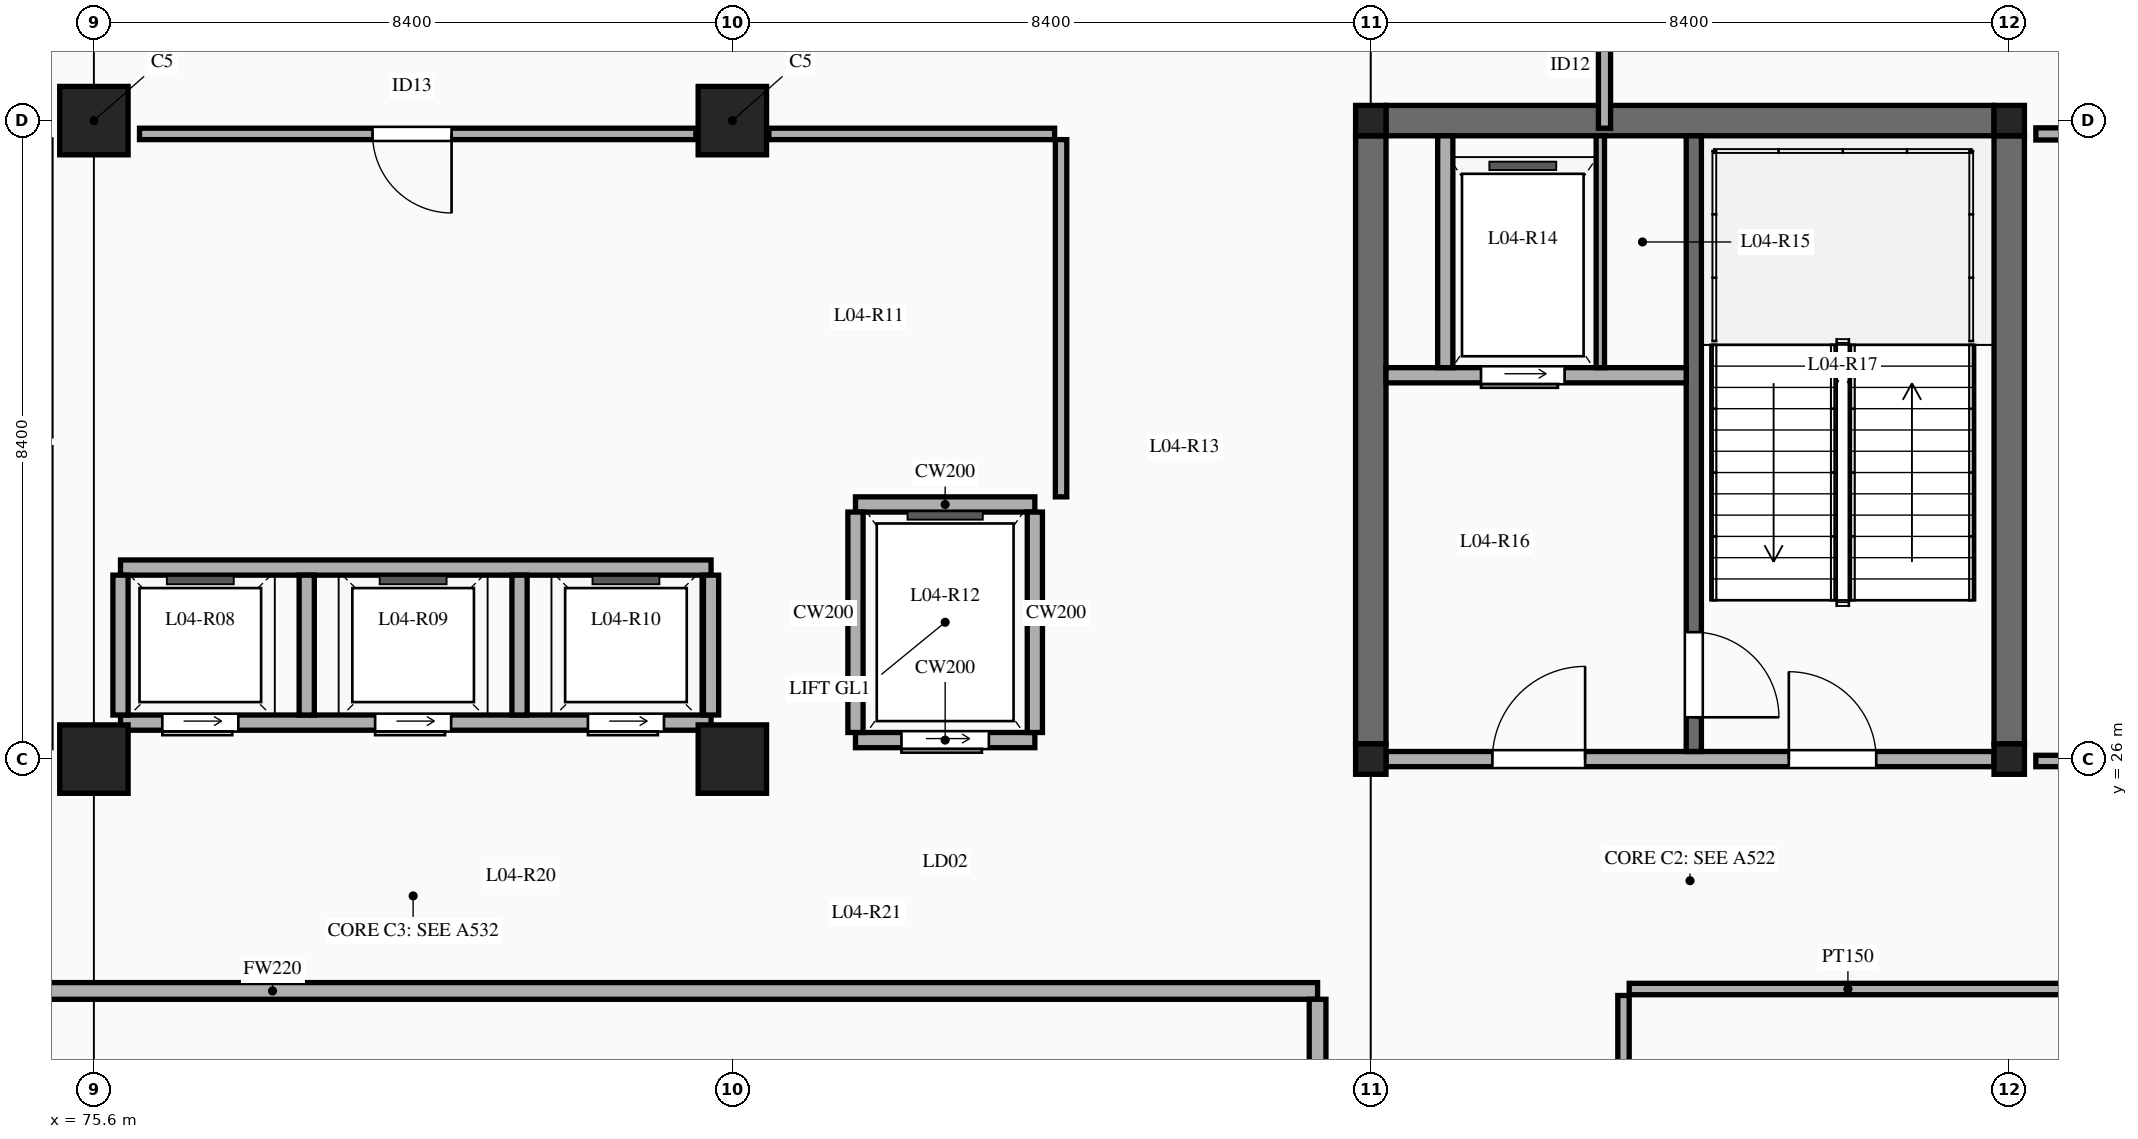
"""IFC4 building model, lengths in metres.
Left out: names, types, materials, properties, quantities, classifications, styles, units other than length and angle.
Written with IfcOpenShell. Run it as: python <this file> out.ifc"""

import sys

from ifc_helpers import new_model, si_unit, direction, frame, frame_2d, origin, origin_2d, place, context, subcontext, project, spatial, rectangle, extrude, element, fill, save


model = new_model("IFC4")
c1 = context("Model", 3, precision=1e-05, world=origin(), true_north=direction((0.0, 1.0)))
c2 = subcontext(c1, "Body", "Model", "MODEL_VIEW")
j1 = project(units=[si_unit("LENGTHUNIT", "METRE"), si_unit("PLANEANGLEUNIT", "RADIAN")], contexts=[c1])
p1 = place(None, origin())
s1 = spatial("IfcSite", under=j1, at=p1, CompositionType="ELEMENT")
p2 = place(p1, origin())
s2 = spatial("IfcBuilding", under=s1, at=p2, CompositionType="ELEMENT")
p3 = place(p2, frame((0.0, 0.0, 19.5)))
s3 = spatial("IfcBuildingStorey", under=s2, at=p3, CompositionType="ELEMENT", Elevation=19.5)
for number, where, z_axis, x_axis in (
    (1, (75.6, 26.0, 0.0), (0.0, 0.0, 1.0), (1.0, 0.0, 0.0)),
    (2, (75.6, 34.4, 0.0), (0.0, 0.0, 1.0), (1.0, 0.0, 0.0)),
    (3, (84.0, 26.0, 0.0), (0.0, 0.0, 1.0), (1.0, 0.0, 0.0)),
    (4, (84.0, 34.4, 0.0), (0.0, 0.0, 1.0), (1.0, 0.0, 0.0)),
):
    element("IfcColumn", number, at=place(p3, frame(where, z_axis=z_axis, x_axis=x_axis)), inside=s3, PredefinedType="COLUMN", context=c2, shape_type="SweptSolid", body=[
        extrude(rectangle(XDim=0.9, YDim=0.9, at=origin_2d()), origin(), (0.0, 0.0, 1.0), 4.5),
    ])
for number, where, z_axis, x_axis in (
    (5, (92.4, 26.0, 0.0), (0.0, 0.0, 1.0), (1.0, 0.0, 0.0)),
    (6, (92.4, 34.4, 0.0), (0.0, 0.0, 1.0), (1.0, 0.0, 0.0)),
    (7, (100.8, 26.0, 0.0), (0.0, 0.0, 1.0), (1.0, 0.0, 0.0)),
    (8, (100.8, 34.4, 0.0), (0.0, 0.0, 1.0), (1.0, 0.0, 0.0)),
):
    element("IfcColumn", number, at=place(p3, frame(where, z_axis=z_axis, x_axis=x_axis)), inside=s3, PredefinedType="COLUMN", context=c2, shape_type="SweptSolid", body=[
        extrude(rectangle(XDim=0.4, YDim=0.4, at=origin_2d()), origin(), (0.0, 0.0, 1.0), 4.5),
    ])
for number, where, z_axis, x_axis in (
    (9, (92.4, 26.2, 0.0), (0.0, 0.0, 1.0), (0.0, 1.0, 0.0)),
    (10, (100.8, 26.2, 0.0), (0.0, 0.0, 1.0), (0.0, 1.0, 0.0)),
    (11, (92.6, 34.4, 0.0), (0.0, 0.0, 1.0), (1.0, 0.0, 0.0)),
):
    element("IfcWall", number, at=place(p3, frame(where, z_axis=z_axis, x_axis=x_axis)), inside=s3, PredefinedType="SHEAR", context=c2, shape_type="SweptSolid", body=[
        extrude(rectangle(XDim=8.0, YDim=0.4, at=frame_2d((4.0, 0.0))), origin(), (0.0, 0.0, 1.0), 4.5),
    ])
p4 = place(p3, frame((92.6, 26.0, 0.0), z_axis=(0.0, 0.0, 1.0), x_axis=(1.0, 0.0, 0.0)))
e12 = element("IfcWall", 12, at=p4, inside=s3, PredefinedType="SOLIDWALL", context=c2, shape_type="SweptSolid", body=[
    extrude(rectangle(XDim=8.0, YDim=0.2, at=frame_2d((4.0, 0.0))), origin(), (0.0, 0.0, 1.0), 3.53),
])
p5 = place(p4, frame((1.4, 0.0, 0.0)))
e13 = element("IfcOpeningElement", 13, at=p5, cuts=e12, PredefinedType="OPENING", context=c2, shape_type="SweptSolid", body=[
    extrude(rectangle(XDim=1.22, YDim=2.15, at=frame_2d((0.61, 1.075))), frame((0.0, 0.11, 0.0), z_axis=(0.0, -1.0, 0.0), x_axis=(1.0, 0.0, 0.0)), (0.0, 0.0, 1.0), 0.22),
])
p6 = place(p4, frame((5.3, 0.0, 0.0)))
e14 = element("IfcOpeningElement", 14, at=p6, cuts=e12, PredefinedType="OPENING", context=c2, shape_type="SweptSolid", body=[
    extrude(rectangle(XDim=1.15, YDim=2.15, at=frame_2d((0.575, 1.075))), frame((0.0, 0.11, 0.0), z_axis=(0.0, -1.0, 0.0), x_axis=(1.0, 0.0, 0.0)), (0.0, 0.0, 1.0), 0.22),
])
p7 = place(p3, frame((96.65, 26.1, 0.0), z_axis=(0.0, 0.0, 1.0), x_axis=(0.0, 1.0, 0.0)))
e15 = element("IfcWall", 15, at=p7, inside=s3, PredefinedType="SOLIDWALL", context=c2, shape_type="SweptSolid", body=[
    extrude(rectangle(XDim=8.1, YDim=0.2, at=frame_2d((4.05, 0.0))), origin(), (0.0, 0.0, 1.0), 4.25),
])
p8 = place(p7, frame((0.45, 0.0, 0.0)))
e16 = element("IfcOpeningElement", 16, at=p8, cuts=e15, PredefinedType="OPENING", context=c2, shape_type="SweptSolid", body=[
    extrude(rectangle(XDim=1.12, YDim=2.15, at=frame_2d((0.56, 1.075))), frame((0.0, 0.11, 0.0), z_axis=(0.0, -1.0, 0.0), x_axis=(1.0, 0.0, 0.0)), (0.0, 0.0, 1.0), 0.22),
])
p9 = place(p3, frame((92.6, 31.05, 0.0), z_axis=(0.0, 0.0, 1.0), x_axis=(1.0, 0.0, 0.0)))
e17 = element("IfcWall", 17, at=p9, inside=s3, PredefinedType="SOLIDWALL", context=c2, shape_type="SweptSolid", body=[
    extrude(rectangle(XDim=3.95, YDim=0.2, at=frame_2d((1.975, 0.0))), origin(), (0.0, 0.0, 1.0), 4.25),
])
p10 = place(p9, frame((1.25, 0.0, 0.0)))
e18 = element("IfcOpeningElement", 18, at=p10, cuts=e17, PredefinedType="OPENING", context=c2, shape_type="SweptSolid", body=[
    extrude(rectangle(XDim=1.1, YDim=2.15, at=frame_2d((0.55, 1.075))), frame((0.0, 0.11, 0.0), z_axis=(0.0, -1.0, 0.0), x_axis=(1.0, 0.0, 0.0)), (0.0, 0.0, 1.0), 0.22),
])
p11 = place(p3, frame((95.42, 31.15, 0.0), z_axis=(0.0, 0.0, 1.0), x_axis=(0.0, 1.0, 0.0)))
e19 = element("IfcWall", 19, at=p11, inside=s3, PredefinedType="PARTITIONING", context=c2, shape_type="SweptSolid", body=[
    extrude(rectangle(XDim=3.05, YDim=0.11, at=frame_2d((1.525, 0.0))), origin(), (0.0, 0.0, 1.0), 4.25),
])
p12 = place(p3, frame((93.38, 31.15, 0.0), z_axis=(0.0, 0.0, 1.0), x_axis=(0.0, 1.0, 0.0)))
e20 = element("IfcWall", 20, at=p12, inside=s3, PredefinedType="SOLIDWALL", context=c2, shape_type="SweptSolid", body=[
    extrude(rectangle(XDim=3.05, YDim=0.2, at=frame_2d((1.525, 0.0))), origin(), (0.0, 0.0, 1.0), 4.25),
])
p13 = place(p3, frame((75.95, 26.48, 0.0), z_axis=(0.0, 0.0, 1.0), x_axis=(1.0, 0.0, 0.0)))
e21 = element("IfcWall", 21, at=p13, inside=s3, PredefinedType="SOLIDWALL", context=c2, shape_type="SweptSolid", body=[
    extrude(rectangle(XDim=7.77, YDim=0.2, at=frame_2d((3.885, 0.0))), origin(), (0.0, 0.0, 1.0), 4.25),
])
p14 = place(p13, frame((0.55, 0.0, 0.0)))
e22 = element("IfcOpeningElement", 22, at=p14, cuts=e21, PredefinedType="OPENING", context=c2, shape_type="SweptSolid", body=[
    extrude(rectangle(XDim=1.0, YDim=2.15, at=frame_2d((0.5, 1.075))), frame((0.0, 0.11, 0.0), z_axis=(0.0, -1.0, 0.0), x_axis=(1.0, 0.0, 0.0)), (0.0, 0.0, 1.0), 0.22),
])
p15 = place(p13, frame((3.35, 0.0, 0.0)))
e23 = element("IfcOpeningElement", 23, at=p15, cuts=e21, PredefinedType="OPENING", context=c2, shape_type="SweptSolid", body=[
    extrude(rectangle(XDim=1.0, YDim=2.15, at=frame_2d((0.5, 1.075))), frame((0.0, 0.11, 0.0), z_axis=(0.0, -1.0, 0.0), x_axis=(1.0, 0.0, 0.0)), (0.0, 0.0, 1.0), 0.22),
])
p16 = place(p13, frame((6.15, 0.0, 0.0)))
e24 = element("IfcOpeningElement", 24, at=p16, cuts=e21, PredefinedType="OPENING", context=c2, shape_type="SweptSolid", body=[
    extrude(rectangle(XDim=1.0, YDim=2.15, at=frame_2d((0.5, 1.075))), frame((0.0, 0.11, 0.0), z_axis=(0.0, -1.0, 0.0), x_axis=(1.0, 0.0, 0.0)), (0.0, 0.0, 1.0), 0.22),
])
p17 = place(p3, frame((75.95, 28.52, 0.0), z_axis=(0.0, 0.0, 1.0), x_axis=(1.0, 0.0, 0.0)))
e25 = element("IfcWall", 25, at=p17, inside=s3, PredefinedType="SOLIDWALL", context=c2, shape_type="SweptSolid", body=[
    extrude(rectangle(XDim=7.77, YDim=0.2, at=frame_2d((3.885, 0.0))), origin(), (0.0, 0.0, 1.0), 4.25),
])
p18 = place(p3, frame((75.95, 26.58, 0.0), z_axis=(0.0, 0.0, 1.0), x_axis=(0.0, 1.0, 0.0)))
e26 = element("IfcWall", 26, at=p18, inside=s3, PredefinedType="SOLIDWALL", context=c2, shape_type="SweptSolid", body=[
    extrude(rectangle(XDim=1.84, YDim=0.2, at=frame_2d((0.92, 0.0))), origin(), (0.0, 0.0, 1.0), 3.68),
])
for number, where, z_axis, x_axis in (
    (27, (78.4, 26.58, 0.0), (0.0, 0.0, 1.0), (0.0, 1.0, 0.0)),
    (28, (81.2, 26.58, 0.0), (0.0, 0.0, 1.0), (0.0, 1.0, 0.0)),
):
    element("IfcWall", number, at=place(p3, frame(where, z_axis=z_axis, x_axis=x_axis)), inside=s3, PredefinedType="SOLIDWALL", context=c2, shape_type="SweptSolid", body=[
        extrude(rectangle(XDim=1.84, YDim=0.2, at=frame_2d((0.92, 0.0))), origin(), (0.0, 0.0, 1.0), 4.25),
    ])
p19 = place(p3, frame((83.72, 26.58, 0.0), z_axis=(0.0, 0.0, 1.0), x_axis=(0.0, 1.0, 0.0)))
e29 = element("IfcWall", 29, at=p19, inside=s3, PredefinedType="SOLIDWALL", context=c2, shape_type="SweptSolid", body=[
    extrude(rectangle(XDim=1.84, YDim=0.2, at=frame_2d((0.92, 0.0))), origin(), (0.0, 0.0, 1.0), 3.68),
])
p20 = place(p3, frame((85.62, 26.25, 0.0), z_axis=(0.0, 0.0, 1.0), x_axis=(1.0, 0.0, 0.0)))
e30 = element("IfcWall", 30, at=p20, inside=s3, PredefinedType="SOLIDWALL", context=c2, shape_type="SweptSolid", body=[
    extrude(rectangle(XDim=2.36, YDim=0.2, at=frame_2d((1.18, 0.0))), origin(), (0.0, 0.0, 1.0), 3.53),
])
p21 = place(p20, frame((0.605, 0.0, 0.0)))
e31 = element("IfcOpeningElement", 31, at=p21, cuts=e30, PredefinedType="OPENING", context=c2, shape_type="SweptSolid", body=[
    extrude(rectangle(XDim=1.15, YDim=2.2, at=frame_2d((0.575, 1.1))), frame((0.0, 0.11, 0.0), z_axis=(0.0, -1.0, 0.0), x_axis=(1.0, 0.0, 0.0)), (0.0, 0.0, 1.0), 0.22),
])
p22 = place(p3, frame((85.62, 29.35, 0.0), z_axis=(0.0, 0.0, 1.0), x_axis=(1.0, 0.0, 0.0)))
e32 = element("IfcWall", 32, at=p22, inside=s3, PredefinedType="SOLIDWALL", context=c2, shape_type="SweptSolid", body=[
    extrude(rectangle(XDim=2.36, YDim=0.2, at=frame_2d((1.18, 0.0))), origin(), (0.0, 0.0, 1.0), 4.25),
])
p23 = place(p3, frame((85.62, 26.35, 0.0), z_axis=(0.0, 0.0, 1.0), x_axis=(0.0, 1.0, 0.0)))
e33 = element("IfcWall", 33, at=p23, inside=s3, PredefinedType="SOLIDWALL", context=c2, shape_type="SweptSolid", body=[
    extrude(rectangle(XDim=2.9, YDim=0.2, at=frame_2d((1.45, 0.0))), origin(), (0.0, 0.0, 1.0), 4.25),
])
p24 = place(p3, frame((87.98, 26.35, 0.0), z_axis=(0.0, 0.0, 1.0), x_axis=(0.0, 1.0, 0.0)))
e34 = element("IfcWall", 34, at=p24, inside=s3, PredefinedType="SOLIDWALL", context=c2, shape_type="SweptSolid", body=[
    extrude(rectangle(XDim=2.9, YDim=0.2, at=frame_2d((1.45, 0.0))), origin(), (0.0, 0.0, 1.0), 3.93),
])
p25 = place(p3, frame((59.5, 22.95, 0.0), z_axis=(0.0, 0.0, 1.0), x_axis=(1.0, 0.0, 0.0)))
e35 = element("IfcWall", 35, at=p25, inside=s3, PredefinedType="SOLIDWALL", context=c2, shape_type="SweptSolid", body=[
    extrude(rectangle(XDim=32.2, YDim=0.22, at=frame_2d((16.1, 0.0))), origin(), (0.0, 0.0, 1.0), 3.45),
])
p26 = place(p25, frame((3.0, 0.0, 0.0)))
e36 = element("IfcOpeningElement", 36, at=p26, cuts=e35, PredefinedType="OPENING", context=c2, shape_type="SweptSolid", body=[
    extrude(rectangle(XDim=1.2, YDim=2.2, at=frame_2d((0.6, 1.1))), frame((0.0, 0.12, 0.0), z_axis=(0.0, -1.0, 0.0), x_axis=(1.0, 0.0, 0.0)), (0.0, 0.0, 1.0), 0.24),
])
p27 = place(p3, frame((91.7, 17.01, 0.0), z_axis=(0.0, 0.0, 1.0), x_axis=(0.0, 1.0, 0.0)))
e37 = element("IfcWall", 37, at=p27, inside=s3, PredefinedType="SOLIDWALL", context=c2, shape_type="SweptSolid", body=[
    extrude(rectangle(XDim=5.83, YDim=0.22, at=frame_2d((2.915, 0.0))), origin(), (0.0, 0.0, 1.0), 3.45),
])
p28 = place(p3, frame((88.325, 29.45, 0.0), z_axis=(0.0, 0.0, 1.0), x_axis=(0.0, 1.0, 0.0)))
e38 = element("IfcWall", 38, at=p28, inside=s3, PredefinedType="PARTITIONING", context=c2, shape_type="SweptSolid", body=[
    extrude(rectangle(XDim=4.7, YDim=0.15, at=frame_2d((2.35, 0.0))), origin(), (0.0, 0.0, 1.0), 3.45),
])
p29 = place(p3, frame((76.2, 34.225, 0.0), z_axis=(0.0, 0.0, 1.0), x_axis=(1.0, 0.0, 0.0)))
e39 = element("IfcWall", 39, at=p29, inside=s3, PredefinedType="PARTITIONING", context=c2, shape_type="SweptSolid", body=[
    extrude(rectangle(XDim=7.32, YDim=0.15, at=frame_2d((3.66, 0.0))), origin(), (0.0, 0.0, 1.0), 3.45),
])
p30 = place(p29, frame((3.066, 0.0, 0.0)))
e40 = element("IfcOpeningElement", 40, at=p30, cuts=e39, PredefinedType="OPENING", context=c2, shape_type="SweptSolid", body=[
    extrude(rectangle(XDim=1.04, YDim=2.15, at=frame_2d((0.52, 1.075))), frame((0.0, 0.085, 0.0), z_axis=(0.0, -1.0, 0.0), x_axis=(1.0, 0.0, 0.0)), (0.0, 0.0, 1.0), 0.17),
])
p31 = place(p3, frame((84.48, 34.225, 0.0), z_axis=(0.0, 0.0, 1.0), x_axis=(1.0, 0.0, 0.0)))
e41 = element("IfcWall", 41, at=p31, inside=s3, PredefinedType="PARTITIONING", context=c2, shape_type="SweptSolid", body=[
    extrude(rectangle(XDim=3.76, YDim=0.15, at=frame_2d((1.88, 0.0))), origin(), (0.0, 0.0, 1.0), 3.45),
])
p32 = place(p3, frame((101.15, 25.975, 0.0), z_axis=(0.0, 0.0, 1.0), x_axis=(1.0, 0.0, 0.0)))
e42 = element("IfcWall", 42, at=p32, inside=s3, PredefinedType="PARTITIONING", context=c2, shape_type="SweptSolid", body=[
    extrude(rectangle(XDim=7.595, YDim=0.15, at=frame_2d((3.798, 0.0))), origin(), (0.0, 0.0, 1.0), 3.45),
])
p33 = place(p32, frame((3.278, 0.0, 0.0)))
e43 = element("IfcOpeningElement", 43, at=p33, cuts=e42, PredefinedType="OPENING", context=c2, shape_type="SweptSolid", body=[
    extrude(rectangle(XDim=1.04, YDim=2.15, at=frame_2d((0.52, 1.075))), frame((0.0, 0.085, 0.0), z_axis=(0.0, -1.0, 0.0), x_axis=(1.0, 0.0, 0.0)), (0.0, 0.0, 1.0), 0.17),
])
p34 = place(p3, frame((101.15, 34.225, 0.0), z_axis=(0.0, 0.0, 1.0), x_axis=(1.0, 0.0, 0.0)))
e44 = element("IfcWall", 44, at=p34, inside=s3, PredefinedType="PARTITIONING", context=c2, shape_type="SweptSolid", body=[
    extrude(rectangle(XDim=7.595, YDim=0.16, at=frame_2d((3.798, 0.0))), origin(), (0.0, 0.0, 1.0), 3.45),
])
p35 = place(p3, frame((95.8, 22.975, 0.0), z_axis=(0.0, 0.0, 1.0), x_axis=(1.0, 0.0, 0.0)))
e45 = element("IfcWall", 45, at=p35, inside=s3, PredefinedType="PARTITIONING", context=c2, shape_type="SweptSolid", body=[
    extrude(rectangle(XDim=12.95, YDim=0.15, at=frame_2d((6.475, 0.0))), origin(), (0.0, 0.0, 1.0), 3.45),
])
p36 = place(p35, frame((6.255, 0.0, 0.0)))
e46 = element("IfcOpeningElement", 46, at=p36, cuts=e45, PredefinedType="OPENING", context=c2, shape_type="SweptSolid", body=[
    extrude(rectangle(XDim=1.04, YDim=2.15, at=frame_2d((0.52, 1.075))), frame((0.0, 0.085, 0.0), z_axis=(0.0, -1.0, 0.0), x_axis=(1.0, 0.0, 0.0)), (0.0, 0.0, 1.0), 0.17),
])
p37 = place(p3, frame((95.725, 14.2, 0.0), z_axis=(0.0, 0.0, 1.0), x_axis=(0.0, 1.0, 0.0)))
e47 = element("IfcWall", 47, at=p37, inside=s3, PredefinedType="PARTITIONING", context=c2, shape_type="SweptSolid", body=[
    extrude(rectangle(XDim=8.69, YDim=0.15, at=frame_2d((4.345, 0.0))), origin(), (0.0, 0.0, 1.0), 3.45),
])
p38 = place(p3, frame((95.475, 34.3, 0.0), z_axis=(0.0, 0.0, 1.0), x_axis=(0.0, 1.0, 0.0)))
e48 = element("IfcWall", 48, at=p38, inside=s3, PredefinedType="PARTITIONING", context=c2, shape_type="SweptSolid", body=[
    extrude(rectangle(XDim=2.735, YDim=0.16, at=frame_2d((1.367, 0.0))), origin(), (0.0, 0.0, 1.0), 3.45),
])
p39 = place(p38, frame((1.278, 0.0, 0.0)))
e49 = element("IfcOpeningElement", 49, at=p39, cuts=e48, PredefinedType="OPENING", context=c2, shape_type="SweptSolid", body=[
    extrude(rectangle(XDim=1.06, YDim=2.18, at=frame_2d((0.53, 1.09))), frame((0.0, 0.09, 0.0), z_axis=(0.0, -1.0, 0.0), x_axis=(1.0, 0.0, 0.0)), (0.0, 0.0, 1.0), 0.18),
])
p40 = place(p5, origin())
e50 = element("IfcDoor", 50, at=p40, inside=s3, OperationType="SINGLE_SWING_RIGHT", PredefinedType="DOOR", context=c2, shape_type="SweptSolid", body=[
    extrude(rectangle(XDim=1.22, YDim=2.15, at=frame_2d((0.61, 1.075))), frame((0.0, 0.025, 0.0), z_axis=(0.0, -1.0, 0.0), x_axis=(1.0, 0.0, 0.0)), (0.0, 0.0, 1.0), 0.05),
])
fill(e13, e50)
p41 = place(p6, origin())
e51 = element("IfcDoor", 51, at=p41, inside=s3, OperationType="SINGLE_SWING_LEFT", PredefinedType="DOOR", context=c2, shape_type="SweptSolid", body=[
    extrude(rectangle(XDim=1.15, YDim=2.15, at=frame_2d((0.575, 1.075))), frame((0.0, 0.025, 0.0), z_axis=(0.0, -1.0, 0.0), x_axis=(1.0, 0.0, 0.0)), (0.0, 0.0, 1.0), 0.05),
])
fill(e14, e51)
p42 = place(p8, frame((1.12, 0.0, 0.0), z_axis=(0.0, 0.0, 1.0), x_axis=(-1.0, 0.0, 0.0)))
e52 = element("IfcDoor", 52, at=p42, inside=s3, OperationType="SINGLE_SWING_RIGHT", PredefinedType="DOOR", context=c2, shape_type="SweptSolid", body=[
    extrude(rectangle(XDim=1.12, YDim=2.15, at=frame_2d((0.56, 1.075))), frame((0.0, 0.025, 0.0), z_axis=(0.0, -1.0, 0.0), x_axis=(1.0, 0.0, 0.0)), (0.0, 0.0, 1.0), 0.05),
])
fill(e16, e52)
p43 = place(p10, frame((1.1, 0.0, 0.0), z_axis=(0.0, 0.0, 1.0), x_axis=(-1.0, 0.0, 0.0)))
e53 = element("IfcDoor", 53, at=p43, inside=s3, OperationType="SLIDING_TO_LEFT", PredefinedType="DOOR", context=c2, shape_type="SweptSolid", body=[
    extrude(rectangle(XDim=1.1, YDim=2.15, at=frame_2d((0.55, 1.075))), frame((0.0, 0.025, 0.0), z_axis=(0.0, -1.0, 0.0), x_axis=(1.0, 0.0, 0.0)), (0.0, 0.0, 1.0), 0.05),
])
fill(e18, e53)
p44 = place(p14, frame((1.0, 0.0, 0.0), z_axis=(0.0, 0.0, 1.0), x_axis=(-1.0, 0.0, 0.0)))
e54 = element("IfcDoor", 54, at=p44, inside=s3, OperationType="SLIDING_TO_LEFT", PredefinedType="DOOR", context=c2, shape_type="SweptSolid", body=[
    extrude(rectangle(XDim=1.0, YDim=2.15, at=frame_2d((0.5, 1.075))), frame((0.0, 0.025, 0.0), z_axis=(0.0, -1.0, 0.0), x_axis=(1.0, 0.0, 0.0)), (0.0, 0.0, 1.0), 0.05),
])
fill(e22, e54)
p45 = place(p15, frame((1.0, 0.0, 0.0), z_axis=(0.0, 0.0, 1.0), x_axis=(-1.0, 0.0, 0.0)))
e55 = element("IfcDoor", 55, at=p45, inside=s3, OperationType="SLIDING_TO_LEFT", PredefinedType="DOOR", context=c2, shape_type="SweptSolid", body=[
    extrude(rectangle(XDim=1.0, YDim=2.15, at=frame_2d((0.5, 1.075))), frame((0.0, 0.025, 0.0), z_axis=(0.0, -1.0, 0.0), x_axis=(1.0, 0.0, 0.0)), (0.0, 0.0, 1.0), 0.05),
])
fill(e23, e55)
p46 = place(p16, frame((1.0, 0.0, 0.0), z_axis=(0.0, 0.0, 1.0), x_axis=(-1.0, 0.0, 0.0)))
e56 = element("IfcDoor", 56, at=p46, inside=s3, OperationType="SLIDING_TO_LEFT", PredefinedType="DOOR", context=c2, shape_type="SweptSolid", body=[
    extrude(rectangle(XDim=1.0, YDim=2.15, at=frame_2d((0.5, 1.075))), frame((0.0, 0.025, 0.0), z_axis=(0.0, -1.0, 0.0), x_axis=(1.0, 0.0, 0.0)), (0.0, 0.0, 1.0), 0.05),
])
fill(e24, e56)
p47 = place(p21, frame((1.15, 0.0, 0.0), z_axis=(0.0, 0.0, 1.0), x_axis=(-1.0, 0.0, 0.0)))
e57 = element("IfcDoor", 57, at=p47, inside=s3, OperationType="SLIDING_TO_LEFT", PredefinedType="DOOR", context=c2, shape_type="SweptSolid", body=[
    extrude(rectangle(XDim=1.15, YDim=2.2, at=frame_2d((0.575, 1.1))), frame((0.0, 0.025, 0.0), z_axis=(0.0, -1.0, 0.0), x_axis=(1.0, 0.0, 0.0)), (0.0, 0.0, 1.0), 0.05),
])
fill(e31, e57)
p48 = place(p30, frame((1.04, 0.0, 0.0), z_axis=(0.0, 0.0, 1.0), x_axis=(-1.0, 0.0, 0.0)))
e58 = element("IfcDoor", 58, at=p48, inside=s3, OperationType="SINGLE_SWING_LEFT", PredefinedType="DOOR", context=c2, shape_type="SweptSolid", body=[
    extrude(rectangle(XDim=1.04, YDim=2.15, at=frame_2d((0.52, 1.075))), frame((0.0, 0.025, 0.0), z_axis=(0.0, -1.0, 0.0), x_axis=(1.0, 0.0, 0.0)), (0.0, 0.0, 1.0), 0.05),
])
fill(e40, e58)
save(model, sys.argv[1])
